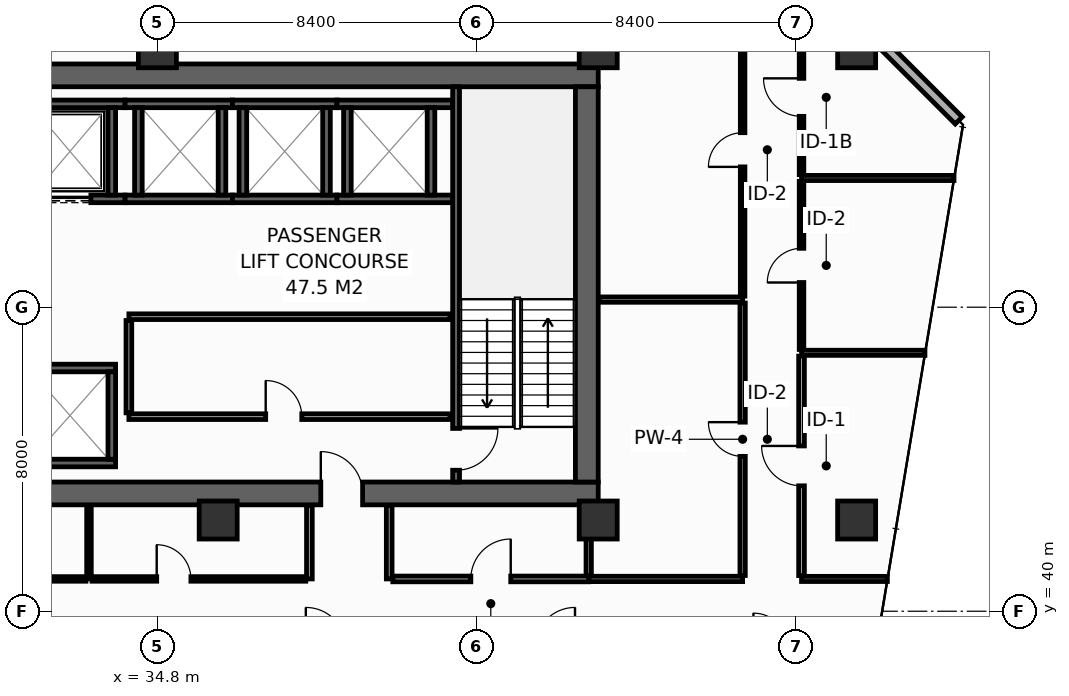
"""IFC4 building model, lengths in metres.
Left out: names, types, materials, properties, quantities, classifications, styles, units other than length and angle.
Written with IfcOpenShell. Run it as: python <this file> out.ifc"""

import sys

from ifc_helpers import new_model, si_unit, direction, frame, frame_2d, origin, origin_2d, place, context, subcontext, project, spatial, rectangle, hollow_rectangle, extrude, element, fill, save


model = new_model("IFC4")
c1 = context("Model", 3, precision=1e-05, world=origin(), true_north=direction((0.0, 1.0)))
c2 = subcontext(c1, "Body", "Model", "MODEL_VIEW")
j1 = project(units=[si_unit("LENGTHUNIT", "METRE"), si_unit("PLANEANGLEUNIT", "RADIAN")], contexts=[c1])
p1 = place(None, origin())
s1 = spatial("IfcSite", under=j1, at=p1, CompositionType="ELEMENT")
p2 = place(p1, origin())
s2 = spatial("IfcBuilding", under=s1, at=p2, CompositionType="ELEMENT")
p3 = place(p2, frame((0.0, 0.0, 114.8)))
s3 = spatial("IfcBuildingStorey", under=s2, at=p3, CompositionType="ELEMENT", Elevation=114.8)
p4 = place(p3, frame((13.5, 43.1, 0.0), z_axis=(0.0, 0.0, 1.0), x_axis=(1.0, 0.0, 0.0)))
e1 = element("IfcWall", 1, at=p4, inside=s3, PredefinedType="SHEAR", context=c2, shape_type="SweptSolid", body=[
    extrude(rectangle(XDim=32.9, YDim=0.6, at=frame_2d((16.45, 0.0))), origin(), (0.0, 0.0, 1.0), 4.15),
])
p5 = place(p4, frame((5.4, 0.0, 0.0)))
e2 = element("IfcOpeningElement", 2, at=p5, cuts=e1, PredefinedType="OPENING", context=c2, shape_type="SweptSolid", body=[
    extrude(rectangle(XDim=1.1, YDim=2.15, at=frame_2d((0.55, 1.075))), frame((0.0, 0.31, 0.0), z_axis=(0.0, -1.0, 0.0), x_axis=(1.0, 0.0, 0.0)), (0.0, 0.0, 1.0), 0.62),
])
p6 = place(p4, frame((25.6, 0.0, 0.0)))
e3 = element("IfcOpeningElement", 3, at=p6, cuts=e1, PredefinedType="OPENING", context=c2, shape_type="SweptSolid", body=[
    extrude(rectangle(XDim=1.1, YDim=2.15, at=frame_2d((0.55, 1.075))), frame((0.0, 0.31, 0.0), z_axis=(0.0, -1.0, 0.0), x_axis=(1.0, 0.0, 0.0)), (0.0, 0.0, 1.0), 0.62),
])
p7 = place(p3, frame((13.5, 54.1, 0.0), z_axis=(0.0, 0.0, 1.0), x_axis=(1.0, 0.0, 0.0)))
e4 = element("IfcWall", 4, at=p7, inside=s3, PredefinedType="SHEAR", context=c2, shape_type="SweptSolid", body=[
    extrude(rectangle(XDim=32.9, YDim=0.6, at=frame_2d((16.45, 0.0))), origin(), (0.0, 0.0, 1.0), 4.15),
])
p8 = place(p3, frame((46.1, 43.4, 0.0), z_axis=(0.0, 0.0, 1.0), x_axis=(0.0, 1.0, 0.0)))
e5 = element("IfcWall", 5, at=p8, inside=s3, PredefinedType="SHEAR", context=c2, shape_type="SweptSolid", body=[
    extrude(rectangle(XDim=10.4, YDim=0.6, at=frame_2d((5.2, 0.0))), origin(), (0.0, 0.0, 1.0), 4.15),
])
for number, where, z_axis, x_axis in (
    (6, (34.8, 54.8, 0.0), (0.0, 0.0, 1.0), (1.0, 0.0, 0.0)),
    (7, (46.4, 54.8, 0.0), (0.0, 0.0, 1.0), (1.0, 0.0, 0.0)),
    (8, (53.2, 54.8, 0.0), (0.0, 0.0, 1.0), (1.0, 0.0, 0.0)),
    (9, (36.4, 42.4, 0.0), (0.0, 0.0, 1.0), (1.0, 0.0, 0.0)),
    (10, (46.4, 42.4, 0.0), (0.0, 0.0, 1.0), (1.0, 0.0, 0.0)),
    (11, (53.2, 42.4, 0.0), (0.0, 0.0, 1.0), (1.0, 0.0, 0.0)),
):
    element("IfcColumn", number, at=place(p3, frame(where, z_axis=z_axis, x_axis=x_axis)), inside=s3, PredefinedType="COLUMN", context=c2, shape_type="SweptSolid", body=[
        extrude(hollow_rectangle(XDim=1.0, YDim=1.0, WallThickness=0.045, at=origin_2d()), origin(), (0.0, 0.0, 1.0), 4.4),
    ])
p9 = place(p3, frame((31.125, 50.85, 0.0), z_axis=(0.0, 0.0, 1.0), x_axis=(1.0, 0.0, 0.0)))
e12 = element("IfcWall", 12, at=p9, inside=s3, PredefinedType="SHEAR", context=c2, shape_type="SweptSolid", body=[
    extrude(rectangle(XDim=2.825, YDim=0.2, at=frame_2d((1.413, 0.0))), origin(), (0.0, 0.0, 1.0), 4.15),
])
p10 = place(p9, frame((0.825, 0.0, 0.0)))
e13 = element("IfcOpeningElement", 13, at=p10, cuts=e12, PredefinedType="OPENING", context=c2, shape_type="SweptSolid", body=[
    extrude(rectangle(XDim=1.1, YDim=2.2, at=frame_2d((0.55, 1.1))), frame((0.0, 0.11, 0.0), z_axis=(0.0, -1.0, 0.0), x_axis=(1.0, 0.0, 0.0)), (0.0, 0.0, 1.0), 0.22),
])
p11 = place(p3, frame((31.125, 53.35, 0.0), z_axis=(0.0, 0.0, 1.0), x_axis=(1.0, 0.0, 0.0)))
e14 = element("IfcWall", 14, at=p11, inside=s3, PredefinedType="SHEAR", context=c2, shape_type="SweptSolid", body=[
    extrude(rectangle(XDim=2.825, YDim=0.2, at=frame_2d((1.413, 0.0))), origin(), (0.0, 0.0, 1.0), 4.15),
])
p12 = place(p3, frame((33.6, 50.95, 0.0), z_axis=(0.0, 0.0, 1.0), x_axis=(0.0, 1.0, 0.0)))
e15 = element("IfcWall", 15, at=p12, inside=s3, PredefinedType="SHEAR", context=c2, shape_type="SweptSolid", body=[
    extrude(rectangle(XDim=2.3, YDim=0.2, at=frame_2d((1.15, 0.0))), origin(), (0.0, 0.0, 1.0), 4.15),
])
for number, where, z_axis, x_axis in (
    (16, (31.125, 43.9, 0.0), (0.0, 0.0, 1.0), (1.0, 0.0, 0.0)),
    (17, (31.125, 46.4, 0.0), (0.0, 0.0, 1.0), (1.0, 0.0, 0.0)),
):
    element("IfcWall", number, at=place(p3, frame(where, z_axis=z_axis, x_axis=x_axis)), inside=s3, PredefinedType="SHEAR", context=c2, shape_type="SweptSolid", body=[
        extrude(rectangle(XDim=2.575, YDim=0.2, at=frame_2d((1.288, 0.0))), origin(), (0.0, 0.0, 1.0), 4.15),
    ])
p13 = place(p3, frame((33.6, 44.0, 0.0), z_axis=(0.0, 0.0, 1.0), x_axis=(0.0, 1.0, 0.0)))
e18 = element("IfcWall", 18, at=p13, inside=s3, PredefinedType="SHEAR", context=c2, shape_type="SweptSolid", body=[
    extrude(rectangle(XDim=2.3, YDim=0.2, at=frame_2d((1.15, 0.0))), origin(), (0.0, 0.0, 1.0), 4.15),
])
for number, where, z_axis, x_axis in (
    (19, (33.95, 50.85, 0.0), (0.0, 0.0, 1.0), (1.0, 0.0, 0.0)),
    (20, (33.95, 53.35, 0.0), (0.0, 0.0, 1.0), (1.0, 0.0, 0.0)),
):
    element("IfcWall", number, at=place(p3, frame(where, z_axis=z_axis, x_axis=x_axis)), inside=s3, PredefinedType="SHEAR", context=c2, shape_type="SweptSolid", body=[
        extrude(rectangle(XDim=2.825, YDim=0.2, at=frame_2d((1.413, 0.0))), origin(), (0.0, 0.0, 1.0), 4.15),
    ])
for number, where, z_axis, x_axis in (
    (21, (34.3, 50.95, 0.0), (0.0, 0.0, 1.0), (0.0, 1.0, 0.0)),
    (22, (36.5, 50.95, 0.0), (0.0, 0.0, 1.0), (0.0, 1.0, 0.0)),
):
    element("IfcWall", number, at=place(p3, frame(where, z_axis=z_axis, x_axis=x_axis)), inside=s3, PredefinedType="SHEAR", context=c2, shape_type="SweptSolid", body=[
        extrude(rectangle(XDim=2.3, YDim=0.2, at=frame_2d((1.15, 0.0))), origin(), (0.0, 0.0, 1.0), 4.15),
    ])
for number, where, z_axis, x_axis in (
    (23, (36.775, 50.85, 0.0), (0.0, 0.0, 1.0), (1.0, 0.0, 0.0)),
    (24, (36.775, 53.35, 0.0), (0.0, 0.0, 1.0), (1.0, 0.0, 0.0)),
):
    element("IfcWall", number, at=place(p3, frame(where, z_axis=z_axis, x_axis=x_axis)), inside=s3, PredefinedType="SHEAR", context=c2, shape_type="SweptSolid", body=[
        extrude(rectangle(XDim=2.75, YDim=0.2, at=frame_2d((1.375, 0.0))), origin(), (0.0, 0.0, 1.0), 4.15),
    ])
for number, where, z_axis, x_axis in (
    (25, (37.05, 50.95, 0.0), (0.0, 0.0, 1.0), (0.0, 1.0, 0.0)),
    (26, (39.25, 50.95, 0.0), (0.0, 0.0, 1.0), (0.0, 1.0, 0.0)),
):
    element("IfcWall", number, at=place(p3, frame(where, z_axis=z_axis, x_axis=x_axis)), inside=s3, PredefinedType="SHEAR", context=c2, shape_type="SweptSolid", body=[
        extrude(rectangle(XDim=2.3, YDim=0.2, at=frame_2d((1.15, 0.0))), origin(), (0.0, 0.0, 1.0), 4.15),
    ])
for number, where, z_axis, x_axis in (
    (27, (39.525, 50.85, 0.0), (0.0, 0.0, 1.0), (1.0, 0.0, 0.0)),
    (28, (39.525, 53.35, 0.0), (0.0, 0.0, 1.0), (1.0, 0.0, 0.0)),
):
    element("IfcWall", number, at=place(p3, frame(where, z_axis=z_axis, x_axis=x_axis)), inside=s3, PredefinedType="SHEAR", context=c2, shape_type="SweptSolid", body=[
        extrude(rectangle(XDim=3.045, YDim=0.2, at=frame_2d((1.522, 0.0))), origin(), (0.0, 0.0, 1.0), 4.15),
    ])
for number, where, z_axis, x_axis in (
    (29, (39.8, 50.95, 0.0), (0.0, 0.0, 1.0), (0.0, 1.0, 0.0)),
    (30, (42.0, 50.95, 0.0), (0.0, 0.0, 1.0), (0.0, 1.0, 0.0)),
):
    element("IfcWall", number, at=place(p3, frame(where, z_axis=z_axis, x_axis=x_axis)), inside=s3, PredefinedType="SHEAR", context=c2, shape_type="SweptSolid", body=[
        extrude(rectangle(XDim=2.3, YDim=0.2, at=frame_2d((1.15, 0.0))), origin(), (0.0, 0.0, 1.0), 4.15),
    ])
p14 = place(p3, frame((42.66, 53.8, 0.0), z_axis=(0.0, 0.0, 1.0), x_axis=(0.0, -1.0, 0.0)))
e31 = element("IfcWall", 31, at=p14, inside=s3, PredefinedType="SHEAR", context=c2, shape_type="SweptSolid", body=[
    extrude(rectangle(XDim=10.4, YDim=0.18, at=frame_2d((5.2, 0.0))), origin(), (0.0, 0.0, 1.0), 4.15),
])
p15 = place(p14, frame((8.99, 0.0, 0.0)))
e32 = element("IfcOpeningElement", 32, at=p15, cuts=e31, PredefinedType="OPENING", context=c2, shape_type="SweptSolid", body=[
    extrude(rectangle(XDim=1.1, YDim=2.15, at=frame_2d((0.55, 1.075))), frame((0.0, 0.1, 0.0), z_axis=(0.0, -1.0, 0.0), x_axis=(1.0, 0.0, 0.0)), (0.0, 0.0, 1.0), 0.2),
])
p16 = place(p3, frame((34.05, 45.12, 0.0), z_axis=(0.0, 0.0, 1.0), x_axis=(1.0, 0.0, 0.0)))
e33 = element("IfcWall", 33, at=p16, inside=s3, PredefinedType="PARTITIONING", context=c2, shape_type="SweptSolid", body=[
    extrude(rectangle(XDim=8.45, YDim=0.15, at=frame_2d((4.225, 0.0))), origin(), (0.0, 0.0, 1.0), 4.15),
])
p17 = place(p16, frame((3.6, 0.0, 0.0)))
e34 = element("IfcOpeningElement", 34, at=p17, cuts=e33, PredefinedType="OPENING", context=c2, shape_type="SweptSolid", body=[
    extrude(rectangle(XDim=0.95, YDim=2.15, at=frame_2d((0.475, 1.075))), frame((0.0, 0.085, 0.0), z_axis=(0.0, -1.0, 0.0), x_axis=(1.0, 0.0, 0.0)), (0.0, 0.0, 1.0), 0.17),
])
p18 = place(p3, frame((34.05, 47.75, 0.0), z_axis=(0.0, 0.0, 1.0), x_axis=(1.0, 0.0, 0.0)))
e35 = element("IfcWall", 35, at=p18, inside=s3, PredefinedType="PARTITIONING", context=c2, shape_type="SweptSolid", body=[
    extrude(rectangle(XDim=8.45, YDim=0.15, at=frame_2d((4.225, 0.0))), origin(), (0.0, 0.0, 1.0), 4.15),
])
p19 = place(p3, frame((34.05, 45.22, 0.0), z_axis=(0.0, 0.0, 1.0), x_axis=(0.0, 1.0, 0.0)))
e36 = element("IfcWall", 36, at=p19, inside=s3, PredefinedType="PARTITIONING", context=c2, shape_type="SweptSolid", body=[
    extrude(rectangle(XDim=2.43, YDim=0.15, at=frame_2d((1.215, 0.0))), origin(), (0.0, 0.0, 1.0), 4.15),
])
p20 = place(p3, frame((55.887, 52.913, 0.0), z_axis=(0.0, 0.0, 1.0), x_axis=(-0.707106781187, 0.707106781187, 0.0)))
e37 = element("IfcWall", 37, at=p20, inside=s3, PredefinedType="STANDARD", context=c2, shape_type="SweptSolid", body=[
    extrude(rectangle(XDim=4.206, YDim=0.26, at=frame_2d((2.103, 0.0))), origin(), (0.0, 0.0, 1.0), 4.15),
])
p21 = place(p3, frame((46.15, 40.85, 0.0), z_axis=(0.0, 0.0, 1.0), x_axis=(1.0, 0.0, 0.0)))
e38 = element("IfcWall", 38, at=p21, inside=s3, PredefinedType="PARTITIONING", context=c2, shape_type="SweptSolid", body=[
    extrude(rectangle(XDim=4.05, YDim=0.14, at=frame_2d((2.025, 0.0))), origin(), (0.0, 0.0, 1.0), 4.15),
])
p22 = place(p3, frame((46.15, 40.94, 0.0), z_axis=(0.0, 0.0, 1.0), x_axis=(0.0, 1.0, 0.0)))
e39 = element("IfcWall", 39, at=p22, inside=s3, PredefinedType="PARTITIONING", context=c2, shape_type="SweptSolid", body=[
    extrude(rectangle(XDim=1.84, YDim=0.14, at=frame_2d((0.92, 0.0))), origin(), (0.0, 0.0, 1.0), 4.15),
])
p23 = place(p3, frame((46.42, 48.2, 0.0), z_axis=(0.0, 0.0, 1.0), x_axis=(1.0, 0.0, 0.0)))
e40 = element("IfcWall", 40, at=p23, inside=s3, PredefinedType="PARTITIONING", context=c2, shape_type="SweptSolid", body=[
    extrude(rectangle(XDim=3.78, YDim=0.14, at=frame_2d((1.89, 0.0))), origin(), (0.0, 0.0, 1.0), 4.15),
])
p24 = place(p3, frame((50.2, 40.94, 0.0), z_axis=(0.0, 0.0, 1.0), x_axis=(0.0, 1.0, 0.0)))
e41 = element("IfcWall", 41, at=p24, inside=s3, PredefinedType="PARTITIONING", context=c2, shape_type="SweptSolid", body=[
    extrude(rectangle(XDim=7.17, YDim=0.14, at=frame_2d((3.585, 0.0))), origin(), (0.0, 0.0, 1.0), 3.335),
])
p25 = place(p24, frame((3.135, 0.0, 0.0)))
e42 = element("IfcOpeningElement", 42, at=p25, cuts=e41, PredefinedType="OPENING", context=c2, shape_type="SweptSolid", body=[
    extrude(rectangle(XDim=0.9, YDim=2.1, at=frame_2d((0.45, 1.05))), frame((0.0, 0.08, 0.0), z_axis=(0.0, -1.0, 0.0), x_axis=(1.0, 0.0, 0.0)), (0.0, 0.0, 1.0), 0.16),
])
p26 = place(p3, frame((50.2, 48.29, 0.0), z_axis=(0.0, 0.0, 1.0), x_axis=(0.0, 1.0, 0.0)))
e43 = element("IfcWall", 43, at=p26, inside=s3, PredefinedType="PARTITIONING", context=c2, shape_type="SweptSolid", body=[
    extrude(rectangle(XDim=7.705, YDim=0.12, at=frame_2d((3.853, 0.0))), origin(), (0.0, 0.0, 1.0), 3.435),
])
p27 = place(p26, frame((3.402, 0.0, 0.0)))
e44 = element("IfcOpeningElement", 44, at=p27, cuts=e43, PredefinedType="OPENING", context=c2, shape_type="SweptSolid", body=[
    extrude(rectangle(XDim=0.9, YDim=2.1, at=frame_2d((0.45, 1.05))), frame((0.0, 0.07, 0.0), z_axis=(0.0, -1.0, 0.0), x_axis=(1.0, 0.0, 0.0)), (0.0, 0.0, 1.0), 0.14),
])
p28 = place(p3, frame((51.75, 40.85, 0.0), z_axis=(0.0, 0.0, 1.0), x_axis=(1.0, 0.0, 0.0)))
e45 = element("IfcWall", 45, at=p28, inside=s3, PredefinedType="PARTITIONING", context=c2, shape_type="SweptSolid", body=[
    extrude(rectangle(XDim=2.258, YDim=0.135, at=frame_2d((1.129, 0.0))), origin(), (0.0, 0.0, 1.0), 3.635),
])
p29 = place(p3, frame((51.75, 46.8, 0.0), z_axis=(0.0, 0.0, 1.0), x_axis=(1.0, 0.0, 0.0)))
e46 = element("IfcWall", 46, at=p29, inside=s3, PredefinedType="PARTITIONING", context=c2, shape_type="SweptSolid", body=[
    extrude(rectangle(XDim=3.247, YDim=0.135, at=frame_2d((1.624, 0.0))), origin(), (0.0, 0.0, 1.0), 3.335),
])
p30 = place(p3, frame((51.75, 51.4, 0.0), z_axis=(0.0, 0.0, 1.0), x_axis=(1.0, 0.0, 0.0)))
e47 = element("IfcWall", 47, at=p30, inside=s3, PredefinedType="PARTITIONING", context=c2, shape_type="SweptSolid", body=[
    extrude(rectangle(XDim=4.012, YDim=0.135, at=frame_2d((2.006, 0.0))), origin(), (0.0, 0.0, 1.0), 3.335),
])
p31 = place(p3, frame((51.75, 40.938, 0.0), z_axis=(0.0, 0.0, 1.0), x_axis=(0.0, 1.0, 0.0)))
e48 = element("IfcWall", 48, at=p31, inside=s3, PredefinedType="PARTITIONING", context=c2, shape_type="SweptSolid", body=[
    extrude(rectangle(XDim=5.775, YDim=0.15, at=frame_2d((2.887, 0.0))), origin(), (0.0, 0.0, 1.0), 3.335),
])
p32 = place(p31, frame((2.362, 0.0, 0.0)))
e49 = element("IfcOpeningElement", 49, at=p32, cuts=e48, PredefinedType="OPENING", context=c2, shape_type="SweptSolid", body=[
    extrude(rectangle(XDim=1.05, YDim=2.15, at=frame_2d((0.525, 1.075))), frame((0.0, 0.085, 0.0), z_axis=(0.0, -1.0, 0.0), x_axis=(1.0, 0.0, 0.0)), (0.0, 0.0, 1.0), 0.17),
])
p33 = place(p3, frame((51.75, 46.887, 0.0), z_axis=(0.0, 0.0, 1.0), x_axis=(0.0, 1.0, 0.0)))
e50 = element("IfcWall", 50, at=p33, inside=s3, PredefinedType="PARTITIONING", context=c2, shape_type="SweptSolid", body=[
    extrude(rectangle(XDim=4.425, YDim=0.12, at=frame_2d((2.212, 0.0))), origin(), (0.0, 0.0, 1.0), 4.15),
])
p34 = place(p33, frame((1.762, 0.0, 0.0)))
e51 = element("IfcOpeningElement", 51, at=p34, cuts=e50, PredefinedType="OPENING", context=c2, shape_type="SweptSolid", body=[
    extrude(rectangle(XDim=0.9, YDim=2.1, at=frame_2d((0.45, 1.05))), frame((0.0, 0.07, 0.0), z_axis=(0.0, -1.0, 0.0), x_axis=(1.0, 0.0, 0.0)), (0.0, 0.0, 1.0), 0.14),
])
p35 = place(p3, frame((51.75, 51.488, 0.0), z_axis=(0.0, 0.0, 1.0), x_axis=(0.0, 1.0, 0.0)))
e52 = element("IfcWall", 52, at=p35, inside=s3, PredefinedType="PARTITIONING", context=c2, shape_type="SweptSolid", body=[
    extrude(rectangle(XDim=4.508, YDim=0.12, at=frame_2d((2.254, 0.0))), origin(), (0.0, 0.0, 1.0), 3.435),
])
p36 = place(p35, frame((1.534, 0.0, 0.0)))
e53 = element("IfcOpeningElement", 53, at=p36, cuts=e52, PredefinedType="OPENING", context=c2, shape_type="SweptSolid", body=[
    extrude(rectangle(XDim=1.0, YDim=2.15, at=frame_2d((0.5, 1.075))), frame((0.0, 0.07, 0.0), z_axis=(0.0, -1.0, 0.0), x_axis=(1.0, 0.0, 0.0)), (0.0, 0.0, 1.0), 0.14),
])
for number, where, z_axis, x_axis in (
    (54, (38.8, 40.85, 0.0), (0.0, 0.0, 1.0), (0.0, 1.0, 0.0)),
    (55, (40.9, 40.85, 0.0), (0.0, 0.0, 1.0), (0.0, 1.0, 0.0)),
):
    element("IfcWall", number, at=place(p3, frame(where, z_axis=z_axis, x_axis=x_axis)), inside=s3, PredefinedType="PARTITIONING", context=c2, shape_type="SweptSolid", body=[
        extrude(rectangle(XDim=1.93, YDim=0.15, at=frame_2d((0.965, 0.0))), origin(), (0.0, 0.0, 1.0), 4.15),
    ])
p37 = place(p3, frame((33.0, 40.85, 0.0), z_axis=(0.0, 0.0, 1.0), x_axis=(0.0, 1.0, 0.0)))
e56 = element("IfcWall", 56, at=p37, inside=s3, PredefinedType="PARTITIONING", context=c2, shape_type="SweptSolid", body=[
    extrude(rectangle(XDim=1.93, YDim=0.12, at=frame_2d((0.965, 0.0))), origin(), (0.0, 0.0, 1.0), 3.335),
])
p38 = place(p3, frame((20.795, 40.85, 0.0), z_axis=(0.0, 0.0, 1.0), x_axis=(1.0, 0.0, 0.0)))
e57 = element("IfcWall", 57, at=p38, inside=s3, PredefinedType="PARTITIONING", context=c2, shape_type="SweptSolid", body=[
    extrude(rectangle(XDim=12.125, YDim=0.12, at=frame_2d((6.062, 0.0))), origin(), (0.0, 0.0, 1.0), 3.335),
])
p39 = place(p38, frame((5.612, 0.0, 0.0)))
e58 = element("IfcOpeningElement", 58, at=p39, cuts=e57, PredefinedType="OPENING", context=c2, shape_type="SweptSolid", body=[
    extrude(rectangle(XDim=0.9, YDim=2.1, at=frame_2d((0.45, 1.05))), frame((0.0, 0.07, 0.0), z_axis=(0.0, -1.0, 0.0), x_axis=(1.0, 0.0, 0.0)), (0.0, 0.0, 1.0), 0.14),
])
p40 = place(p3, frame((33.08, 40.85, 0.0), z_axis=(0.0, 0.0, 1.0), x_axis=(1.0, 0.0, 0.0)))
e59 = element("IfcWall", 59, at=p40, inside=s3, PredefinedType="PARTITIONING", context=c2, shape_type="SweptSolid", body=[
    extrude(rectangle(XDim=5.625, YDim=0.12, at=frame_2d((2.812, 0.0))), origin(), (0.0, 0.0, 1.0), 3.335),
])
p41 = place(p40, frame((1.702, 0.0, 0.0)))
e60 = element("IfcOpeningElement", 60, at=p41, cuts=e59, PredefinedType="OPENING", context=c2, shape_type="SweptSolid", body=[
    extrude(rectangle(XDim=0.9, YDim=2.1, at=frame_2d((0.45, 1.05))), frame((0.0, 0.07, 0.0), z_axis=(0.0, -1.0, 0.0), x_axis=(1.0, 0.0, 0.0)), (0.0, 0.0, 1.0), 0.14),
])
p42 = place(p3, frame((40.995, 40.85, 0.0), z_axis=(0.0, 0.0, 1.0), x_axis=(1.0, 0.0, 0.0)))
e61 = element("IfcWall", 61, at=p42, inside=s3, PredefinedType="PARTITIONING", context=c2, shape_type="SweptSolid", body=[
    extrude(rectangle(XDim=5.155, YDim=0.15, at=frame_2d((2.577, 0.0))), origin(), (0.0, 0.0, 1.0), 4.15),
])
p43 = place(p42, frame((2.053, 0.0, 0.0)))
e62 = element("IfcOpeningElement", 62, at=p43, cuts=e61, PredefinedType="OPENING", context=c2, shape_type="SweptSolid", body=[
    extrude(rectangle(XDim=1.05, YDim=2.15, at=frame_2d((0.525, 1.075))), frame((0.0, 0.085, 0.0), z_axis=(0.0, -1.0, 0.0), x_axis=(1.0, 0.0, 0.0)), (0.0, 0.0, 1.0), 0.17),
])
p44 = place(p10, origin())
e63 = element("IfcDoor", 63, at=p44, inside=s3, OperationType="SLIDING_TO_LEFT", PredefinedType="DOOR", context=c2, shape_type="SweptSolid", body=[
    extrude(rectangle(XDim=1.1, YDim=2.2, at=frame_2d((0.55, 1.1))), frame((0.0, 0.025, 0.0), z_axis=(0.0, -1.0, 0.0), x_axis=(1.0, 0.0, 0.0)), (0.0, 0.0, 1.0), 0.05),
])
fill(e13, e63)
p45 = place(p15, origin())
e64 = element("IfcDoor", 64, at=p45, inside=s3, OperationType="SINGLE_SWING_LEFT", PredefinedType="DOOR", context=c2, shape_type="SweptSolid", body=[
    extrude(rectangle(XDim=1.1, YDim=2.15, at=frame_2d((0.55, 1.075))), frame((0.0, 0.025, 0.0), z_axis=(0.0, -1.0, 0.0), x_axis=(1.0, 0.0, 0.0)), (0.0, 0.0, 1.0), 0.05),
])
fill(e32, e64)
p46 = place(p6, origin())
e65 = element("IfcDoor", 65, at=p46, inside=s3, OperationType="SINGLE_SWING_LEFT", PredefinedType="DOOR", context=c2, shape_type="SweptSolid", body=[
    extrude(rectangle(XDim=1.1, YDim=2.15, at=frame_2d((0.55, 1.075))), frame((0.0, 0.025, 0.0), z_axis=(0.0, -1.0, 0.0), x_axis=(1.0, 0.0, 0.0)), (0.0, 0.0, 1.0), 0.05),
])
fill(e3, e65)
p47 = place(p17, origin())
e66 = element("IfcDoor", 66, at=p47, inside=s3, OperationType="SINGLE_SWING_LEFT", PredefinedType="DOOR", context=c2, shape_type="SweptSolid", body=[
    extrude(rectangle(XDim=0.95, YDim=2.15, at=frame_2d((0.475, 1.075))), frame((0.0, 0.025, 0.0), z_axis=(0.0, -1.0, 0.0), x_axis=(1.0, 0.0, 0.0)), (0.0, 0.0, 1.0), 0.05),
])
fill(e34, e66)
p48 = place(p25, origin())
e67 = element("IfcDoor", 67, at=p48, inside=s3, OperationType="SINGLE_SWING_RIGHT", PredefinedType="DOOR", context=c2, shape_type="SweptSolid", body=[
    extrude(rectangle(XDim=0.9, YDim=2.1, at=frame_2d((0.45, 1.05))), frame((0.0, 0.025, 0.0), z_axis=(0.0, -1.0, 0.0), x_axis=(1.0, 0.0, 0.0)), (0.0, 0.0, 1.0), 0.05),
])
fill(e42, e67)
p49 = place(p27, origin())
e68 = element("IfcDoor", 68, at=p49, inside=s3, OperationType="SINGLE_SWING_LEFT", PredefinedType="DOOR", context=c2, shape_type="SweptSolid", body=[
    extrude(rectangle(XDim=0.9, YDim=2.1, at=frame_2d((0.45, 1.05))), frame((0.0, 0.025, 0.0), z_axis=(0.0, -1.0, 0.0), x_axis=(1.0, 0.0, 0.0)), (0.0, 0.0, 1.0), 0.05),
])
fill(e44, e68)
p50 = place(p32, origin())
e69 = element("IfcDoor", 69, at=p50, inside=s3, OperationType="SINGLE_SWING_RIGHT", PredefinedType="DOOR", context=c2, shape_type="SweptSolid", body=[
    extrude(rectangle(XDim=1.05, YDim=2.15, at=frame_2d((0.525, 1.075))), frame((0.0, 0.025, 0.0), z_axis=(0.0, -1.0, 0.0), x_axis=(1.0, 0.0, 0.0)), (0.0, 0.0, 1.0), 0.05),
])
fill(e49, e69)
p51 = place(p34, origin())
e70 = element("IfcDoor", 70, at=p51, inside=s3, OperationType="SINGLE_SWING_LEFT", PredefinedType="DOOR", context=c2, shape_type="SweptSolid", body=[
    extrude(rectangle(XDim=0.9, YDim=2.1, at=frame_2d((0.45, 1.05))), frame((0.0, 0.025, 0.0), z_axis=(0.0, -1.0, 0.0), x_axis=(1.0, 0.0, 0.0)), (0.0, 0.0, 1.0), 0.05),
])
fill(e51, e70)
p52 = place(p36, origin())
e71 = element("IfcDoor", 71, at=p52, inside=s3, OperationType="SINGLE_SWING_RIGHT", PredefinedType="DOOR", context=c2, shape_type="SweptSolid", body=[
    extrude(rectangle(XDim=1.0, YDim=2.15, at=frame_2d((0.5, 1.075))), frame((0.0, 0.025, 0.0), z_axis=(0.0, -1.0, 0.0), x_axis=(1.0, 0.0, 0.0)), (0.0, 0.0, 1.0), 0.05),
])
fill(e53, e71)
p53 = place(p41, origin())
e72 = element("IfcDoor", 72, at=p53, inside=s3, OperationType="SINGLE_SWING_LEFT", PredefinedType="DOOR", context=c2, shape_type="SweptSolid", body=[
    extrude(rectangle(XDim=0.9, YDim=2.1, at=frame_2d((0.45, 1.05))), frame((0.0, 0.025, 0.0), z_axis=(0.0, -1.0, 0.0), x_axis=(1.0, 0.0, 0.0)), (0.0, 0.0, 1.0), 0.05),
])
fill(e60, e72)
p54 = place(p43, origin())
e73 = element("IfcDoor", 73, at=p54, inside=s3, OperationType="SINGLE_SWING_RIGHT", PredefinedType="DOOR", context=c2, shape_type="SweptSolid", body=[
    extrude(rectangle(XDim=1.05, YDim=2.15, at=frame_2d((0.525, 1.075))), frame((0.0, 0.025, 0.0), z_axis=(0.0, -1.0, 0.0), x_axis=(1.0, 0.0, 0.0)), (0.0, 0.0, 1.0), 0.05),
])
fill(e62, e73)
save(model, sys.argv[1])
